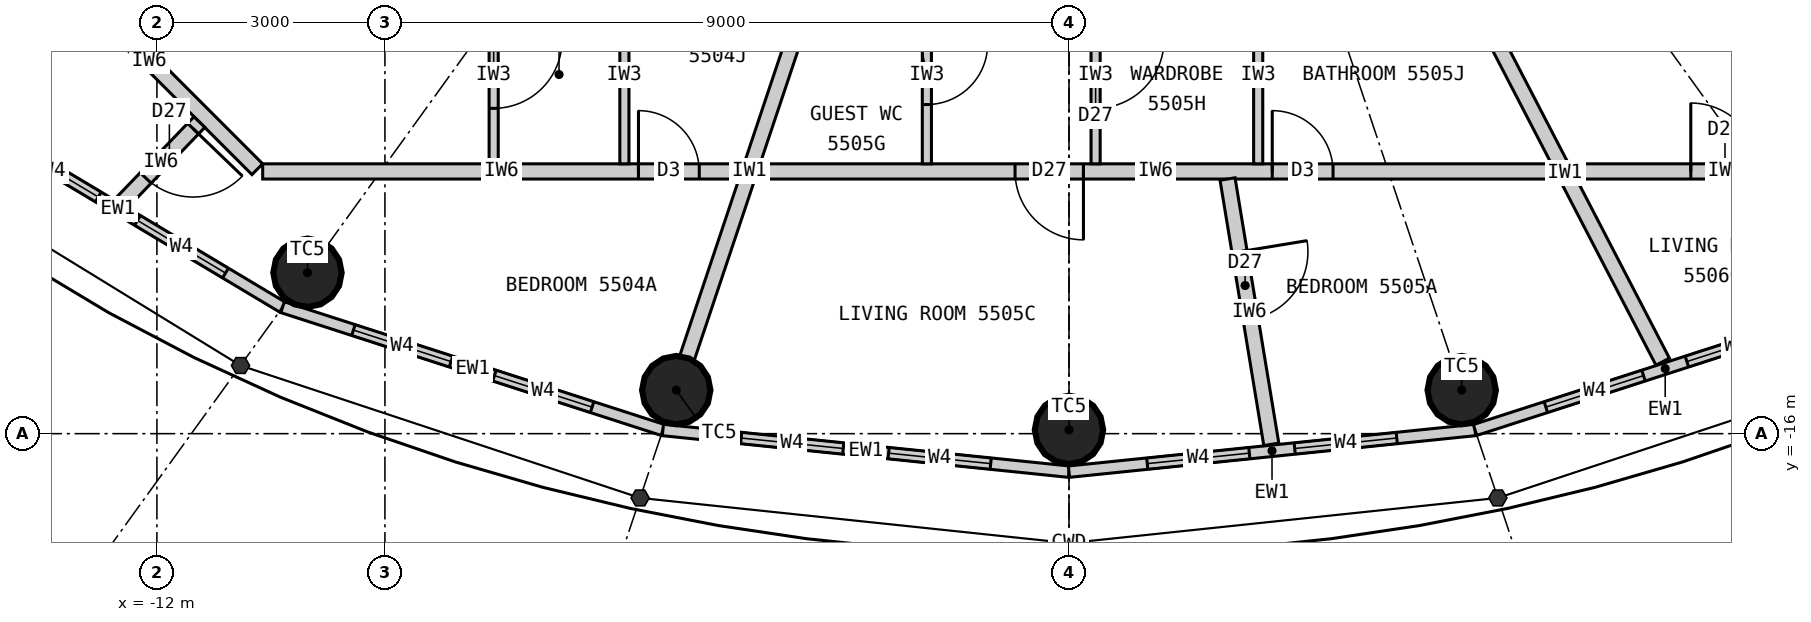
"""IFC4 building model, lengths in metres.
Left out: names, types, materials, properties, quantities, classifications, styles, units other than length and angle.
Written with IfcOpenShell. Run it as: python <this file> out.ifc"""

import sys

from ifc_helpers import new_model, si_unit, direction, frame, frame_2d, origin, origin_2d, place, context, subcontext, project, spatial, rectangle, circle, extrude, element, fill, save


model = new_model("IFC4")
c1 = context("Model", 3, precision=1e-05, world=origin(), true_north=direction((0.0, 1.0)))
c2 = subcontext(c1, "Body", "Model", "MODEL_VIEW")
j1 = project(units=[si_unit("LENGTHUNIT", "METRE"), si_unit("PLANEANGLEUNIT", "RADIAN")], contexts=[c1])
p1 = place(None, origin())
s1 = spatial("IfcSite", under=j1, at=p1, CompositionType="ELEMENT")
p2 = place(p1, origin())
s2 = spatial("IfcBuilding", under=s1, at=p2, CompositionType="ELEMENT")
p3 = place(p2, frame((0.0, 0.0, 206.1)))
s3 = spatial("IfcBuildingStorey", under=s2, at=p3, CompositionType="ELEMENT", Elevation=206.1)
for number, where, z_axis, x_axis in (
    (1, (-10.019, -13.883, 0.0), (0.0, 0.0, 1.0), (1.0, 0.0, 0.0)),
    (2, (-5.167, -15.427, 0.0), (0.0, 0.0, 1.0), (1.0, 0.0, 0.0)),
    (3, (0.0, -15.95, 0.0), (0.0, 0.0, 1.0), (1.0, 0.0, 0.0)),
    (4, (5.167, -15.427, 0.0), (0.0, 0.0, 1.0), (1.0, 0.0, 0.0)),
):
    element("IfcColumn", number, at=place(p3, frame(where, z_axis=z_axis, x_axis=x_axis)), inside=s3, PredefinedType="COLUMN", context=c2, shape_type="SweptSolid", body=[
        extrude(circle(Radius=0.45, at=origin_2d()), origin(), (0.0, 0.0, 1.0), 3.3),
    ])
p4 = place(p3, frame((-14.68, -11.744, 0.0), z_axis=(0.0, 0.0, 1.0), x_axis=(0.85822150553, -0.513279502265, 0.0)))
e5 = element("IfcWall", 5, at=p4, inside=s3, PredefinedType="ELEMENTEDWALL", context=c2, shape_type="SweptSolid", body=[
    extrude(rectangle(XDim=5.05, YDim=0.15, at=frame_2d((2.525, 0.0))), origin(), (0.0, 0.0, 1.0), 3.12),
])
p5 = place(p4, frame((0.875, 0.0, 0.9)))
e6 = element("IfcOpeningElement", 6, at=p5, cuts=e5, PredefinedType="OPENING", context=c2, shape_type="SweptSolid", body=[
    extrude(rectangle(XDim=1.35, YDim=1.9, at=frame_2d((0.675, 0.95))), frame((0.0, 0.085, 0.0), z_axis=(0.0, -1.0, 0.0), x_axis=(1.0, 0.0, 0.0)), (0.0, 0.0, 1.0), 0.17),
])
p6 = place(p4, frame((2.825, 0.0, 0.9)))
e7 = element("IfcOpeningElement", 7, at=p6, cuts=e5, PredefinedType="OPENING", context=c2, shape_type="SweptSolid", body=[
    extrude(rectangle(XDim=1.35, YDim=1.9, at=frame_2d((0.675, 0.95))), frame((0.0, 0.085, 0.0), z_axis=(0.0, -1.0, 0.0), x_axis=(1.0, 0.0, 0.0)), (0.0, 0.0, 1.0), 0.17),
])
p7 = place(p3, frame((-10.346, -14.336, 0.0), z_axis=(0.0, 0.0, 1.0), x_axis=(0.951644702515, -0.307200846638, 0.0)))
e8 = element("IfcWall", 8, at=p7, inside=s3, PredefinedType="ELEMENTEDWALL", context=c2, shape_type="SweptSolid", body=[
    extrude(rectangle(XDim=5.258, YDim=0.15, at=frame_2d((2.629, 0.0))), origin(), (0.0, 0.0, 1.0), 3.12),
])
p8 = place(p7, frame((0.979, 0.0, 0.9)))
e9 = element("IfcOpeningElement", 9, at=p8, cuts=e8, PredefinedType="OPENING", context=c2, shape_type="SweptSolid", body=[
    extrude(rectangle(XDim=1.35, YDim=1.9, at=frame_2d((0.675, 0.95))), frame((0.0, 0.085, 0.0), z_axis=(0.0, -1.0, 0.0), x_axis=(1.0, 0.0, 0.0)), (0.0, 0.0, 1.0), 0.17),
])
p9 = place(p7, frame((2.929, 0.0, 0.9)))
e10 = element("IfcOpeningElement", 10, at=p9, cuts=e8, PredefinedType="OPENING", context=c2, shape_type="SweptSolid", body=[
    extrude(rectangle(XDim=1.35, YDim=1.9, at=frame_2d((0.675, 0.95))), frame((0.0, 0.085, 0.0), z_axis=(0.0, -1.0, 0.0), x_axis=(1.0, 0.0, 0.0)), (0.0, 0.0, 1.0), 0.17),
])
p10 = place(p3, frame((-5.343, -15.952, 0.0), z_axis=(0.0, 0.0, 1.0), x_axis=(0.994774574972, -0.102095763818, 0.0)))
e11 = element("IfcWall", 11, at=p10, inside=s3, PredefinedType="ELEMENTEDWALL", context=c2, shape_type="SweptSolid", body=[
    extrude(rectangle(XDim=5.371, YDim=0.15, at=frame_2d((2.686, 0.0))), origin(), (0.0, 0.0, 1.0), 3.12),
])
p11 = place(p10, frame((1.035, 0.0, 0.9)))
e12 = element("IfcOpeningElement", 12, at=p11, cuts=e11, PredefinedType="OPENING", context=c2, shape_type="SweptSolid", body=[
    extrude(rectangle(XDim=1.35, YDim=1.9, at=frame_2d((0.675, 0.95))), frame((0.0, 0.085, 0.0), z_axis=(0.0, -1.0, 0.0), x_axis=(1.0, 0.0, 0.0)), (0.0, 0.0, 1.0), 0.17),
])
p12 = place(p10, frame((2.985, 0.0, 0.9)))
e13 = element("IfcOpeningElement", 13, at=p12, cuts=e11, PredefinedType="OPENING", context=c2, shape_type="SweptSolid", body=[
    extrude(rectangle(XDim=1.35, YDim=1.9, at=frame_2d((0.675, 0.95))), frame((0.0, 0.085, 0.0), z_axis=(0.0, -1.0, 0.0), x_axis=(1.0, 0.0, 0.0)), (0.0, 0.0, 1.0), 0.17),
])
p13 = place(p3, frame((0.0, -16.5, 0.0), z_axis=(0.0, 0.0, 1.0), x_axis=(0.994774574972, 0.102095763818, 0.0)))
e14 = element("IfcWall", 14, at=p13, inside=s3, PredefinedType="ELEMENTEDWALL", context=c2, shape_type="SweptSolid", body=[
    extrude(rectangle(XDim=5.371, YDim=0.15, at=frame_2d((2.686, 0.0))), origin(), (0.0, 0.0, 1.0), 3.12),
])
p14 = place(p13, frame((1.035, 0.0, 0.9)))
e15 = element("IfcOpeningElement", 15, at=p14, cuts=e14, PredefinedType="OPENING", context=c2, shape_type="SweptSolid", body=[
    extrude(rectangle(XDim=1.35, YDim=1.9, at=frame_2d((0.675, 0.95))), frame((0.0, 0.085, 0.0), z_axis=(0.0, -1.0, 0.0), x_axis=(1.0, 0.0, 0.0)), (0.0, 0.0, 1.0), 0.17),
])
p15 = place(p13, frame((2.985, 0.0, 0.9)))
e16 = element("IfcOpeningElement", 16, at=p15, cuts=e14, PredefinedType="OPENING", context=c2, shape_type="SweptSolid", body=[
    extrude(rectangle(XDim=1.35, YDim=1.9, at=frame_2d((0.675, 0.95))), frame((0.0, 0.085, 0.0), z_axis=(0.0, -1.0, 0.0), x_axis=(1.0, 0.0, 0.0)), (0.0, 0.0, 1.0), 0.17),
])
p16 = place(p3, frame((5.343, -15.952, 0.0), z_axis=(0.0, 0.0, 1.0), x_axis=(0.951644702515, 0.307200846638, 0.0)))
e17 = element("IfcWall", 17, at=p16, inside=s3, PredefinedType="ELEMENTEDWALL", context=c2, shape_type="SweptSolid", body=[
    extrude(rectangle(XDim=5.258, YDim=0.15, at=frame_2d((2.629, 0.0))), origin(), (0.0, 0.0, 1.0), 3.12),
])
p17 = place(p16, frame((0.979, 0.0, 0.9)))
e18 = element("IfcOpeningElement", 18, at=p17, cuts=e17, PredefinedType="OPENING", context=c2, shape_type="SweptSolid", body=[
    extrude(rectangle(XDim=1.35, YDim=1.9, at=frame_2d((0.675, 0.95))), frame((0.0, 0.085, 0.0), z_axis=(0.0, -1.0, 0.0), x_axis=(1.0, 0.0, 0.0)), (0.0, 0.0, 1.0), 0.17),
])
p18 = place(p16, frame((2.929, 0.0, 0.9)))
e19 = element("IfcOpeningElement", 19, at=p18, cuts=e17, PredefinedType="OPENING", context=c2, shape_type="SweptSolid", body=[
    extrude(rectangle(XDim=1.35, YDim=1.9, at=frame_2d((0.675, 0.95))), frame((0.0, 0.085, 0.0), z_axis=(0.0, -1.0, 0.0), x_axis=(1.0, 0.0, 0.0)), (0.0, 0.0, 1.0), 0.17),
])
p19 = place(p3, frame((-3.383, -10.1, 0.0), z_axis=(0.0, 0.0, 1.0), x_axis=(-0.317602151035, -0.948224063003, 0.0)))
e20 = element("IfcWall", 20, at=p19, inside=s3, PredefinedType="PARTITIONING", context=c2, shape_type="SweptSolid", body=[
    extrude(rectangle(XDim=5.168, YDim=0.2, at=frame_2d((2.584, 0.0))), origin(), (0.0, 0.0, 1.0), 2.42),
])
p20 = place(p3, frame((5.241, -10.1, 0.0), z_axis=(0.0, 0.0, 1.0), x_axis=(0.460603196597, -0.887606160008, 0.0)))
e21 = element("IfcWall", 21, at=p20, inside=s3, PredefinedType="PARTITIONING", context=c2, shape_type="SweptSolid", body=[
    extrude(rectangle(XDim=5.58, YDim=0.2, at=frame_2d((2.79, 0.0))), origin(), (0.0, 0.0, 1.0), 3.12),
])
p21 = place(p3, frame((-13.521, -9.679, 0.0), z_axis=(0.0, 0.0, 1.0), x_axis=(0.707106781187, -0.707106781187, 0.0)))
e22 = element("IfcWall", 22, at=p21, inside=s3, PredefinedType="PARTITIONING", context=c2, shape_type="SweptSolid", body=[
    extrude(rectangle(XDim=4.019, YDim=0.2, at=frame_2d((2.009, 0.0))), origin(), (0.0, 0.0, 1.0), 3.12),
])
p22 = place(p3, frame((-10.609, -12.55, 0.0), z_axis=(0.0, 0.0, 1.0), x_axis=(1.0, 0.0, 0.0)))
e23 = element("IfcWall", 23, at=p22, inside=s3, PredefinedType="PARTITIONING", context=c2, shape_type="SweptSolid", body=[
    extrude(rectangle(XDim=6.284, YDim=0.2, at=frame_2d((3.142, 0.0))), origin(), (0.0, 0.0, 1.0), 3.12),
])
p23 = place(p22, frame((4.944, 0.0, 0.0)))
e24 = element("IfcOpeningElement", 24, at=p23, cuts=e23, PredefinedType="OPENING", context=c2, shape_type="SweptSolid", body=[
    extrude(rectangle(XDim=0.8, YDim=2.1, at=frame_2d((0.4, 1.05))), frame((0.0, 0.11, 0.0), z_axis=(0.0, -1.0, 0.0), x_axis=(1.0, 0.0, 0.0)), (0.0, 0.0, 1.0), 0.22),
])
p24 = place(p3, frame((-11.441, -11.9, 0.0), z_axis=(0.0, 0.0, 1.0), x_axis=(-0.692958717259, -0.720977264672, 0.0)))
e25 = element("IfcWall", 25, at=p24, inside=s3, PredefinedType="PARTITIONING", context=c2, shape_type="SweptSolid", body=[
    extrude(rectangle(XDim=1.464, YDim=0.2, at=frame_2d((0.732, 0.0))), origin(), (0.0, 0.0, 1.0), 3.12),
])
p25 = place(p24, frame((0.12, 0.0, 0.0)))
e26 = element("IfcOpeningElement", 26, at=p25, cuts=e25, PredefinedType="OPENING", context=c2, shape_type="SweptSolid", body=[
    extrude(rectangle(XDim=0.9, YDim=2.1, at=frame_2d((0.45, 1.05))), frame((0.0, 0.11, 0.0), z_axis=(0.0, -1.0, 0.0), x_axis=(1.0, 0.0, 0.0)), (0.0, 0.0, 1.0), 0.22),
])
p26 = place(p3, frame((-7.569, -10.1, 0.0), z_axis=(0.0, 0.0, 1.0), x_axis=(0.0, -1.0, 0.0)))
e27 = element("IfcWall", 27, at=p26, inside=s3, PredefinedType="PARTITIONING", context=c2, shape_type="SweptSolid", body=[
    extrude(rectangle(XDim=2.35, YDim=0.12, at=frame_2d((1.175, 0.0))), origin(), (0.0, 0.0, 1.0), 3.12),
])
p27 = place(p26, frame((0.72, 0.0, 0.0)))
e28 = element("IfcOpeningElement", 28, at=p27, cuts=e27, PredefinedType="OPENING", context=c2, shape_type="SweptSolid", body=[
    extrude(rectangle(XDim=0.9, YDim=2.1, at=frame_2d((0.45, 1.05))), frame((0.0, 0.07, 0.0), z_axis=(0.0, -1.0, 0.0), x_axis=(1.0, 0.0, 0.0)), (0.0, 0.0, 1.0), 0.14),
])
p28 = place(p3, frame((-5.849, -10.1, 0.0), z_axis=(0.0, 0.0, 1.0), x_axis=(0.0, -1.0, 0.0)))
e29 = element("IfcWall", 29, at=p28, inside=s3, PredefinedType="PARTITIONING", context=c2, shape_type="SweptSolid", body=[
    extrude(rectangle(XDim=2.35, YDim=0.12, at=frame_2d((1.175, 0.0))), origin(), (0.0, 0.0, 1.0), 3.12),
])
p29 = place(p3, frame((-4.082, -12.55, 0.0), z_axis=(0.0, 0.0, 1.0), x_axis=(1.0, 0.0, 0.0)))
e30 = element("IfcWall", 30, at=p29, inside=s3, PredefinedType="PARTITIONING", context=c2, shape_type="SweptSolid", body=[
    extrude(rectangle(XDim=10.446, YDim=0.2, at=frame_2d((5.223, 0.0))), origin(), (0.0, 0.0, 1.0), 3.12),
])
p30 = place(p29, frame((6.757, 0.0, 0.0)))
e31 = element("IfcOpeningElement", 31, at=p30, cuts=e30, PredefinedType="OPENING", context=c2, shape_type="SweptSolid", body=[
    extrude(rectangle(XDim=0.8, YDim=2.1, at=frame_2d((0.4, 1.05))), frame((0.0, 0.11, 0.0), z_axis=(0.0, -1.0, 0.0), x_axis=(1.0, 0.0, 0.0)), (0.0, 0.0, 1.0), 0.22),
])
p31 = place(p29, frame((3.372, 0.0, 0.0)))
e32 = element("IfcOpeningElement", 32, at=p31, cuts=e30, PredefinedType="OPENING", context=c2, shape_type="SweptSolid", body=[
    extrude(rectangle(XDim=0.9, YDim=2.1, at=frame_2d((0.45, 1.05))), frame((0.0, 0.11, 0.0), z_axis=(0.0, -1.0, 0.0), x_axis=(1.0, 0.0, 0.0)), (0.0, 0.0, 1.0), 0.22),
])
p32 = place(p3, frame((2.086, -12.65, 0.0), z_axis=(0.0, 0.0, 1.0), x_axis=(0.162664077359, -0.986681507852, 0.0)))
e33 = element("IfcWall", 33, at=p32, inside=s3, PredefinedType="PARTITIONING", context=c2, shape_type="SweptSolid", body=[
    extrude(rectangle(XDim=3.538, YDim=0.2, at=frame_2d((1.769, 0.0))), origin(), (0.0, 0.0, 1.0), 3.12),
])
p33 = place(p32, frame((0.97, 0.0, 0.0)))
e34 = element("IfcOpeningElement", 34, at=p33, cuts=e33, PredefinedType="OPENING", context=c2, shape_type="SweptSolid", body=[
    extrude(rectangle(XDim=0.9, YDim=2.1, at=frame_2d((0.45, 1.05))), frame((0.0, 0.11, 0.0), z_axis=(0.0, -1.0, 0.0), x_axis=(1.0, 0.0, 0.0)), (0.0, 0.0, 1.0), 0.22),
])
p34 = place(p3, frame((-1.87, -10.1, 0.0), z_axis=(0.0, 0.0, 1.0), x_axis=(0.0, -1.0, 0.0)))
e35 = element("IfcWall", 35, at=p34, inside=s3, PredefinedType="PARTITIONING", context=c2, shape_type="SweptSolid", body=[
    extrude(rectangle(XDim=2.35, YDim=0.12, at=frame_2d((1.175, 0.0))), origin(), (0.0, 0.0, 1.0), 3.12),
])
p35 = place(p34, frame((0.77, 0.0, 0.0)))
e36 = element("IfcOpeningElement", 36, at=p35, cuts=e35, PredefinedType="OPENING", context=c2, shape_type="SweptSolid", body=[
    extrude(rectangle(XDim=0.8, YDim=2.1, at=frame_2d((0.4, 1.05))), frame((0.0, 0.07, 0.0), z_axis=(0.0, -1.0, 0.0), x_axis=(1.0, 0.0, 0.0)), (0.0, 0.0, 1.0), 0.14),
])
p36 = place(p3, frame((0.35, -10.1, 0.0), z_axis=(0.0, 0.0, 1.0), x_axis=(0.0, -1.0, 0.0)))
e37 = element("IfcWall", 37, at=p36, inside=s3, PredefinedType="PARTITIONING", context=c2, shape_type="SweptSolid", body=[
    extrude(rectangle(XDim=2.35, YDim=0.12, at=frame_2d((1.175, 0.0))), origin(), (0.0, 0.0, 1.0), 3.12),
])
p37 = place(p36, frame((0.72, 0.0, 0.0)))
e38 = element("IfcOpeningElement", 38, at=p37, cuts=e37, PredefinedType="OPENING", context=c2, shape_type="SweptSolid", body=[
    extrude(rectangle(XDim=0.9, YDim=2.1, at=frame_2d((0.45, 1.05))), frame((0.0, 0.07, 0.0), z_axis=(0.0, -1.0, 0.0), x_axis=(1.0, 0.0, 0.0)), (0.0, 0.0, 1.0), 0.14),
])
p38 = place(p3, frame((2.49, -10.1, 0.0), z_axis=(0.0, 0.0, 1.0), x_axis=(0.0, -1.0, 0.0)))
e39 = element("IfcWall", 39, at=p38, inside=s3, PredefinedType="PARTITIONING", context=c2, shape_type="SweptSolid", body=[
    extrude(rectangle(XDim=2.35, YDim=0.12, at=frame_2d((1.175, 0.0))), origin(), (0.0, 0.0, 1.0), 3.12),
])
p39 = place(p3, frame((6.661, -12.55, 0.0), z_axis=(0.0, 0.0, 1.0), x_axis=(1.0, 0.0, 0.0)))
e40 = element("IfcWall", 40, at=p39, inside=s3, PredefinedType="PARTITIONING", context=c2, shape_type="SweptSolid", body=[
    extrude(rectangle(XDim=3.947, YDim=0.2, at=frame_2d((1.974, 0.0))), origin(), (0.0, 0.0, 1.0), 3.12),
])
p40 = place(p39, frame((1.52, 0.0, 0.0)))
e41 = element("IfcOpeningElement", 41, at=p40, cuts=e40, PredefinedType="OPENING", context=c2, shape_type="SweptSolid", body=[
    extrude(rectangle(XDim=0.9, YDim=2.1, at=frame_2d((0.45, 1.05))), frame((0.0, 0.11, 0.0), z_axis=(0.0, -1.0, 0.0), x_axis=(1.0, 0.0, 0.0)), (0.0, 0.0, 1.0), 0.22),
])
p41 = place(p5, origin())
e42 = element("IfcWindow", 42, at=p41, inside=s3, PartitioningType="SINGLE_PANEL", PredefinedType="WINDOW", context=c2, shape_type="SweptSolid", body=[
    extrude(rectangle(XDim=1.35, YDim=1.9, at=frame_2d((0.675, 0.95))), frame((0.0, 0.03, 0.0), z_axis=(0.0, -1.0, 0.0), x_axis=(1.0, 0.0, 0.0)), (0.0, 0.0, 1.0), 0.06),
])
fill(e6, e42)
p42 = place(p6, origin())
e43 = element("IfcWindow", 43, at=p42, inside=s3, PartitioningType="SINGLE_PANEL", PredefinedType="WINDOW", context=c2, shape_type="SweptSolid", body=[
    extrude(rectangle(XDim=1.35, YDim=1.9, at=frame_2d((0.675, 0.95))), frame((0.0, 0.03, 0.0), z_axis=(0.0, -1.0, 0.0), x_axis=(1.0, 0.0, 0.0)), (0.0, 0.0, 1.0), 0.06),
])
fill(e7, e43)
p43 = place(p8, origin())
e44 = element("IfcWindow", 44, at=p43, inside=s3, PartitioningType="SINGLE_PANEL", PredefinedType="WINDOW", context=c2, shape_type="SweptSolid", body=[
    extrude(rectangle(XDim=1.35, YDim=1.9, at=frame_2d((0.675, 0.95))), frame((0.0, 0.03, 0.0), z_axis=(0.0, -1.0, 0.0), x_axis=(1.0, 0.0, 0.0)), (0.0, 0.0, 1.0), 0.06),
])
fill(e9, e44)
p44 = place(p9, origin())
e45 = element("IfcWindow", 45, at=p44, inside=s3, PartitioningType="SINGLE_PANEL", PredefinedType="WINDOW", context=c2, shape_type="SweptSolid", body=[
    extrude(rectangle(XDim=1.35, YDim=1.9, at=frame_2d((0.675, 0.95))), frame((0.0, 0.03, 0.0), z_axis=(0.0, -1.0, 0.0), x_axis=(1.0, 0.0, 0.0)), (0.0, 0.0, 1.0), 0.06),
])
fill(e10, e45)
p45 = place(p11, origin())
e46 = element("IfcWindow", 46, at=p45, inside=s3, PartitioningType="SINGLE_PANEL", PredefinedType="WINDOW", context=c2, shape_type="SweptSolid", body=[
    extrude(rectangle(XDim=1.35, YDim=1.9, at=frame_2d((0.675, 0.95))), frame((0.0, 0.03, 0.0), z_axis=(0.0, -1.0, 0.0), x_axis=(1.0, 0.0, 0.0)), (0.0, 0.0, 1.0), 0.06),
])
fill(e12, e46)
p46 = place(p12, origin())
e47 = element("IfcWindow", 47, at=p46, inside=s3, PartitioningType="SINGLE_PANEL", PredefinedType="WINDOW", context=c2, shape_type="SweptSolid", body=[
    extrude(rectangle(XDim=1.35, YDim=1.9, at=frame_2d((0.675, 0.95))), frame((0.0, 0.03, 0.0), z_axis=(0.0, -1.0, 0.0), x_axis=(1.0, 0.0, 0.0)), (0.0, 0.0, 1.0), 0.06),
])
fill(e13, e47)
p47 = place(p14, origin())
e48 = element("IfcWindow", 48, at=p47, inside=s3, PartitioningType="SINGLE_PANEL", PredefinedType="WINDOW", context=c2, shape_type="SweptSolid", body=[
    extrude(rectangle(XDim=1.35, YDim=1.9, at=frame_2d((0.675, 0.95))), frame((0.0, 0.03, 0.0), z_axis=(0.0, -1.0, 0.0), x_axis=(1.0, 0.0, 0.0)), (0.0, 0.0, 1.0), 0.06),
])
fill(e15, e48)
p48 = place(p15, origin())
e49 = element("IfcWindow", 49, at=p48, inside=s3, PartitioningType="SINGLE_PANEL", PredefinedType="WINDOW", context=c2, shape_type="SweptSolid", body=[
    extrude(rectangle(XDim=1.35, YDim=1.9, at=frame_2d((0.675, 0.95))), frame((0.0, 0.03, 0.0), z_axis=(0.0, -1.0, 0.0), x_axis=(1.0, 0.0, 0.0)), (0.0, 0.0, 1.0), 0.06),
])
fill(e16, e49)
p49 = place(p17, origin())
e50 = element("IfcWindow", 50, at=p49, inside=s3, PartitioningType="SINGLE_PANEL", PredefinedType="WINDOW", context=c2, shape_type="SweptSolid", body=[
    extrude(rectangle(XDim=1.35, YDim=1.9, at=frame_2d((0.675, 0.95))), frame((0.0, 0.03, 0.0), z_axis=(0.0, -1.0, 0.0), x_axis=(1.0, 0.0, 0.0)), (0.0, 0.0, 1.0), 0.06),
])
fill(e18, e50)
p50 = place(p18, origin())
e51 = element("IfcWindow", 51, at=p50, inside=s3, PartitioningType="SINGLE_PANEL", PredefinedType="WINDOW", context=c2, shape_type="SweptSolid", body=[
    extrude(rectangle(XDim=1.35, YDim=1.9, at=frame_2d((0.675, 0.95))), frame((0.0, 0.03, 0.0), z_axis=(0.0, -1.0, 0.0), x_axis=(1.0, 0.0, 0.0)), (0.0, 0.0, 1.0), 0.06),
])
fill(e19, e51)
p51 = place(p27, origin())
e52 = element("IfcDoor", 52, at=p51, inside=s3, OperationType="SINGLE_SWING_LEFT", PredefinedType="DOOR", context=c2, shape_type="SweptSolid", body=[
    extrude(rectangle(XDim=0.9, YDim=2.1, at=frame_2d((0.45, 1.05))), frame((0.0, 0.025, 0.0), z_axis=(0.0, -1.0, 0.0), x_axis=(1.0, 0.0, 0.0)), (0.0, 0.0, 1.0), 0.05),
])
fill(e28, e52)
p52 = place(p23, origin())
e53 = element("IfcDoor", 53, at=p52, inside=s3, OperationType="SINGLE_SWING_LEFT", PredefinedType="DOOR", context=c2, shape_type="SweptSolid", body=[
    extrude(rectangle(XDim=0.8, YDim=2.1, at=frame_2d((0.4, 1.05))), frame((0.0, 0.025, 0.0), z_axis=(0.0, -1.0, 0.0), x_axis=(1.0, 0.0, 0.0)), (0.0, 0.0, 1.0), 0.05),
])
fill(e24, e53)
p53 = place(p25, origin())
e54 = element("IfcDoor", 54, at=p53, inside=s3, OperationType="SINGLE_SWING_LEFT", PredefinedType="DOOR", context=c2, shape_type="SweptSolid", body=[
    extrude(rectangle(XDim=0.9, YDim=2.1, at=frame_2d((0.45, 1.05))), frame((0.0, 0.025, 0.0), z_axis=(0.0, -1.0, 0.0), x_axis=(1.0, 0.0, 0.0)), (0.0, 0.0, 1.0), 0.05),
])
fill(e26, e54)
p54 = place(p35, origin())
e55 = element("IfcDoor", 55, at=p54, inside=s3, OperationType="SINGLE_SWING_LEFT", PredefinedType="DOOR", context=c2, shape_type="SweptSolid", body=[
    extrude(rectangle(XDim=0.8, YDim=2.1, at=frame_2d((0.4, 1.05))), frame((0.0, 0.025, 0.0), z_axis=(0.0, -1.0, 0.0), x_axis=(1.0, 0.0, 0.0)), (0.0, 0.0, 1.0), 0.05),
])
fill(e36, e55)
p55 = place(p37, origin())
e56 = element("IfcDoor", 56, at=p55, inside=s3, OperationType="SINGLE_SWING_LEFT", PredefinedType="DOOR", context=c2, shape_type="SweptSolid", body=[
    extrude(rectangle(XDim=0.9, YDim=2.1, at=frame_2d((0.45, 1.05))), frame((0.0, 0.025, 0.0), z_axis=(0.0, -1.0, 0.0), x_axis=(1.0, 0.0, 0.0)), (0.0, 0.0, 1.0), 0.05),
])
fill(e38, e56)
p56 = place(p30, origin())
e57 = element("IfcDoor", 57, at=p56, inside=s3, OperationType="SINGLE_SWING_LEFT", PredefinedType="DOOR", context=c2, shape_type="SweptSolid", body=[
    extrude(rectangle(XDim=0.8, YDim=2.1, at=frame_2d((0.4, 1.05))), frame((0.0, 0.025, 0.0), z_axis=(0.0, -1.0, 0.0), x_axis=(1.0, 0.0, 0.0)), (0.0, 0.0, 1.0), 0.05),
])
fill(e31, e57)
p57 = place(p31, origin())
e58 = element("IfcDoor", 58, at=p57, inside=s3, OperationType="SINGLE_SWING_RIGHT", PredefinedType="DOOR", context=c2, shape_type="SweptSolid", body=[
    extrude(rectangle(XDim=0.9, YDim=2.1, at=frame_2d((0.45, 1.05))), frame((0.0, 0.025, 0.0), z_axis=(0.0, -1.0, 0.0), x_axis=(1.0, 0.0, 0.0)), (0.0, 0.0, 1.0), 0.05),
])
fill(e32, e58)
p58 = place(p33, origin())
e59 = element("IfcDoor", 59, at=p58, inside=s3, OperationType="SINGLE_SWING_LEFT", PredefinedType="DOOR", context=c2, shape_type="SweptSolid", body=[
    extrude(rectangle(XDim=0.9, YDim=2.1, at=frame_2d((0.45, 1.05))), frame((0.0, 0.025, 0.0), z_axis=(0.0, -1.0, 0.0), x_axis=(1.0, 0.0, 0.0)), (0.0, 0.0, 1.0), 0.05),
])
fill(e34, e59)
p59 = place(p40, origin())
e60 = element("IfcDoor", 60, at=p59, inside=s3, OperationType="SINGLE_SWING_LEFT", PredefinedType="DOOR", context=c2, shape_type="SweptSolid", body=[
    extrude(rectangle(XDim=0.9, YDim=2.1, at=frame_2d((0.45, 1.05))), frame((0.0, 0.025, 0.0), z_axis=(0.0, -1.0, 0.0), x_axis=(1.0, 0.0, 0.0)), (0.0, 0.0, 1.0), 0.05),
])
fill(e41, e60)
save(model, sys.argv[1])
